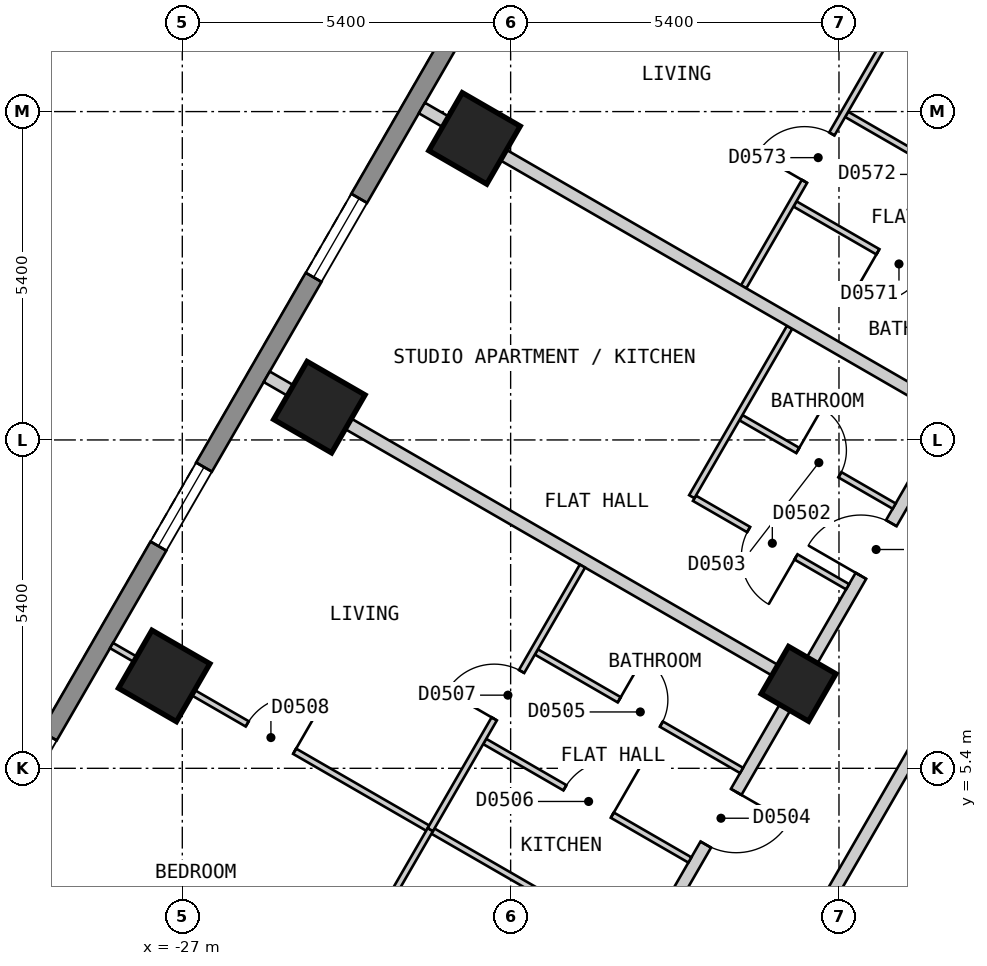
"""IFC4 building model, lengths in metres.
Left out: names, types, materials, properties, quantities, classifications, styles, units other than length and angle.
Written with IfcOpenShell. Run it as: python <this file> out.ifc"""

import sys

from ifc_helpers import new_model, si_unit, direction, frame, frame_2d, origin, origin_2d, place, context, subcontext, project, spatial, polyline, rectangle, outline, extrude, element, fill, save


model = new_model("IFC4")
c1 = context("Model", 3, precision=1e-05, world=origin(), true_north=direction((0.0, 1.0)))
c2 = subcontext(c1, "Body", "Model", "MODEL_VIEW")
j1 = project(units=[si_unit("LENGTHUNIT", "METRE"), si_unit("PLANEANGLEUNIT", "RADIAN")], contexts=[c1])
p1 = place(None, origin())
s1 = spatial("IfcSite", under=j1, at=p1, CompositionType="ELEMENT")
p2 = place(p1, origin())
s2 = spatial("IfcBuilding", under=s1, at=p2, CompositionType="ELEMENT")
p3 = place(p2, frame((0.0, 0.0, 44.4)))
s3 = spatial("IfcBuildingStorey", under=s2, at=p3, CompositionType="ELEMENT", Elevation=44.4)
for number, where, z_axis, x_axis in (
    (1, (-22.194, 15.759, 0.0), (0.0, 0.0, 1.0), (-0.5, -0.866, 0.0)),
    (2, (-24.746, 11.339, 0.0), (0.0, 0.0, 1.0), (-0.5, -0.866, 0.0)),
    (3, (-27.298, 6.919, 0.0), (0.0, 0.0, 1.0), (-0.5, -0.866, 0.0)),
):
    element("IfcColumn", number, at=place(p3, frame(where, z_axis=z_axis, x_axis=x_axis)), inside=s3, PredefinedType="COLUMN", context=c2, shape_type="SweptSolid", body=[
        extrude(rectangle(XDim=1.1, YDim=1.1, at=origin_2d()), origin(), (0.0, 0.0, 1.0), 3.0),
    ])
p4 = place(p3, frame((-16.865, 6.789, 0.0), z_axis=(0.0, 0.0, 1.0), x_axis=(-0.499984884929, -0.866034130299, 0.0)))
e4 = element("IfcColumn", 4, at=p4, inside=s3, PredefinedType="COLUMN", context=c2, shape_type="SweptSolid", body=[
    extrude(rectangle(XDim=0.9, YDim=0.9, at=origin_2d()), origin(), (0.0, 0.0, 1.0), 3.0),
])
p5 = place(p3, frame((-17.71, 25.825, 0.0), z_axis=(0.0, 0.0, 1.0), x_axis=(-0.500001938803, -0.866024284413, 0.0)))
e5 = element("IfcWall", 5, at=p5, inside=s3, PredefinedType="SOLIDWALL", context=c2, shape_type="SweptSolid", body=[
    extrude(outline(polyline([(0.0, -0.15), (27.02, -0.15), (26.94, 0.15), (0.08, 0.15), (0.0, -0.15)])), origin(), (0.0, 0.0, 1.0), 2.7),
])
p6 = place(p5, frame((2.553, 0.0, 0.15)))
e6 = element("IfcOpeningElement", 6, at=p6, cuts=e5, PredefinedType="OPENING", context=c2, shape_type="SweptSolid", body=[
    extrude(rectangle(XDim=1.5, YDim=2.1, at=frame_2d((0.75, 1.05))), frame((0.0, 0.16, 0.0), z_axis=(0.0, -1.0, 0.0), x_axis=(1.0, 0.0, 0.0)), (0.0, 0.0, 1.0), 0.32),
])
p7 = place(p5, frame((7.658, 0.0, 0.15)))
e7 = element("IfcOpeningElement", 7, at=p7, cuts=e5, PredefinedType="OPENING", context=c2, shape_type="SweptSolid", body=[
    extrude(rectangle(XDim=1.5, YDim=2.1, at=frame_2d((0.75, 1.05))), frame((0.0, 0.16, 0.0), z_axis=(0.0, -1.0, 0.0), x_axis=(1.0, 0.0, 0.0)), (0.0, 0.0, 1.0), 0.32),
])
p8 = place(p5, frame((12.761, 0.0, 0.15)))
e8 = element("IfcOpeningElement", 8, at=p8, cuts=e5, PredefinedType="OPENING", context=c2, shape_type="SweptSolid", body=[
    extrude(rectangle(XDim=1.5, YDim=2.1, at=frame_2d((0.75, 1.05))), frame((0.0, 0.16, 0.0), z_axis=(0.0, -1.0, 0.0), x_axis=(1.0, 0.0, 0.0)), (0.0, 0.0, 1.0), 0.32),
])
p9 = place(p5, frame((17.865, 0.0, 0.15)))
e9 = element("IfcOpeningElement", 9, at=p9, cuts=e5, PredefinedType="OPENING", context=c2, shape_type="SweptSolid", body=[
    extrude(rectangle(XDim=1.5, YDim=2.1, at=frame_2d((0.75, 1.05))), frame((0.0, 0.16, 0.0), z_axis=(0.0, -1.0, 0.0), x_axis=(1.0, 0.0, 0.0)), (0.0, 0.0, 1.0), 0.32),
])
p10 = place(p5, frame((22.969, 0.0, 0.15)))
e10 = element("IfcOpeningElement", 10, at=p10, cuts=e5, PredefinedType="OPENING", context=c2, shape_type="SweptSolid", body=[
    extrude(rectangle(XDim=1.5, YDim=2.1, at=frame_2d((0.75, 1.05))), frame((0.0, 0.16, 0.0), z_axis=(0.0, -1.0, 0.0), x_axis=(1.0, 0.0, 0.0)), (0.0, 0.0, 1.0), 0.32),
])
p11 = place(p3, frame((-18.244, -0.001, 0.0), z_axis=(0.0, 0.0, 1.0), x_axis=(0.499962999376, 0.866046765051, 0.0)))
e11 = element("IfcWall", 11, at=p11, inside=s3, PredefinedType="PARTITIONING", context=c2, shape_type="SweptSolid", body=[
    extrude(rectangle(XDim=18.245, YDim=0.2, at=frame_2d((9.123, 0.0))), origin(), (0.0, 0.0, 1.0), 2.7),
])
p12 = place(p11, frame((8.672, 0.0, 0.0)))
e12 = element("IfcOpeningElement", 12, at=p12, cuts=e11, PredefinedType="OPENING", context=c2, shape_type="SweptSolid", body=[
    extrude(rectangle(XDim=0.9, YDim=2.1, at=frame_2d((0.45, 1.05))), frame((0.0, 0.11, 0.0), z_axis=(0.0, -1.0, 0.0), x_axis=(1.0, 0.0, 0.0)), (0.0, 0.0, 1.0), 0.22),
])
p13 = place(p3, frame((-20.727, 0.099, 0.0), z_axis=(0.0, 0.0, 1.0), x_axis=(0.499993204491, 0.866029327138, 0.0)))
e13 = element("IfcWall", 13, at=p13, inside=s3, PredefinedType="PARTITIONING", context=c2, shape_type="SweptSolid", body=[
    extrude(rectangle(XDim=20.554, YDim=0.2, at=frame_2d((10.277, 0.0))), origin(), (0.0, 0.0, 1.0), 2.7),
])
p14 = place(p13, frame((9.776, 0.0, 0.0)))
e14 = element("IfcOpeningElement", 14, at=p14, cuts=e13, PredefinedType="OPENING", context=c2, shape_type="SweptSolid", body=[
    extrude(rectangle(XDim=1.0, YDim=2.1, at=frame_2d((0.5, 1.05))), frame((0.0, 0.11, 0.0), z_axis=(0.0, -1.0, 0.0), x_axis=(1.0, 0.0, 0.0)), (0.0, 0.0, 1.0), 0.22),
])
p15 = place(p13, frame((4.673, 0.0, 0.0)))
e15 = element("IfcOpeningElement", 15, at=p15, cuts=e13, PredefinedType="OPENING", context=c2, shape_type="SweptSolid", body=[
    extrude(rectangle(XDim=1.0, YDim=2.1, at=frame_2d((0.5, 1.05))), frame((0.0, 0.11, 0.0), z_axis=(0.0, -1.0, 0.0), x_axis=(1.0, 0.0, 0.0)), (0.0, 0.0, 1.0), 0.22),
])
p16 = place(p13, frame((14.88, 0.0, 0.0)))
e16 = element("IfcOpeningElement", 16, at=p16, cuts=e13, PredefinedType="OPENING", context=c2, shape_type="SweptSolid", body=[
    extrude(rectangle(XDim=1.0, YDim=2.1, at=frame_2d((0.5, 1.05))), frame((0.0, 0.11, 0.0), z_axis=(0.0, -1.0, 0.0), x_axis=(1.0, 0.0, 0.0)), (0.0, 0.0, 1.0), 0.22),
])
p17 = place(p3, frame((-21.177, 7.314, 0.0), z_axis=(0.0, 0.0, 1.0), x_axis=(0.865979019114, -0.500080332001, 0.0)))
e17 = element("IfcWall", 17, at=p17, inside=s3, PredefinedType="PARTITIONING", context=c2, shape_type="SweptSolid", body=[
    extrude(rectangle(XDim=3.897, YDim=0.1, at=frame_2d((1.949, 0.0))), origin(), (0.0, 0.0, 1.0), 2.7),
])
p18 = place(p17, frame((1.574, 0.0, 0.0)))
e18 = element("IfcOpeningElement", 18, at=p18, cuts=e17, PredefinedType="OPENING", context=c2, shape_type="SweptSolid", body=[
    extrude(rectangle(XDim=0.8, YDim=2.1, at=frame_2d((0.4, 1.05))), frame((0.0, 0.06, 0.0), z_axis=(0.0, -1.0, 0.0), x_axis=(1.0, 0.0, 0.0)), (0.0, 0.0, 1.0), 0.12),
])
p19 = place(p3, frame((-22.027, 5.842, 0.0), z_axis=(0.0, 0.0, 1.0), x_axis=(0.865979019114, -0.500080332001, 0.0)))
e19 = element("IfcWall", 19, at=p19, inside=s3, PredefinedType="PARTITIONING", context=c2, shape_type="SweptSolid", body=[
    extrude(rectangle(XDim=3.897, YDim=0.1, at=frame_2d((1.949, 0.0))), origin(), (0.0, 0.0, 1.0), 2.7),
])
p20 = place(p19, frame((1.524, 0.0, 0.0)))
e20 = element("IfcOpeningElement", 20, at=p20, cuts=e19, PredefinedType="OPENING", context=c2, shape_type="SweptSolid", body=[
    extrude(rectangle(XDim=0.9, YDim=2.1, at=frame_2d((0.45, 1.05))), frame((0.0, 0.06, 0.0), z_axis=(0.0, -1.0, 0.0), x_axis=(1.0, 0.0, 0.0)), (0.0, 0.0, 1.0), 0.12),
])
p21 = place(p3, frame((-28.164, 7.419, 0.0), z_axis=(0.0, 0.0, 1.0), x_axis=(0.866047370643, -0.499961950354, 0.0)))
e21 = element("IfcWall", 21, at=p21, inside=s3, PredefinedType="PARTITIONING", context=c2, shape_type="SweptSolid", body=[
    extrude(rectangle(XDim=10.001, YDim=0.1, at=frame_2d((5.0, 0.0))), origin(), (0.0, 0.0, 1.0), 2.7),
])
p22 = place(p21, frame((2.577, 0.0, 0.0)))
e22 = element("IfcOpeningElement", 22, at=p22, cuts=e21, PredefinedType="OPENING", context=c2, shape_type="SweptSolid", body=[
    extrude(rectangle(XDim=0.9, YDim=2.1, at=frame_2d((0.45, 1.05))), frame((0.0, 0.06, 0.0), z_axis=(0.0, -1.0, 0.0), x_axis=(1.0, 0.0, 0.0)), (0.0, 0.0, 1.0), 0.12),
])
p23 = place(p3, frame((-18.577, 9.841, 0.0), z_axis=(0.0, 0.0, 1.0), x_axis=(0.865899003441, -0.500218867937, 0.0)))
e23 = element("IfcWall", 23, at=p23, inside=s3, PredefinedType="PARTITIONING", context=c2, shape_type="SweptSolid", body=[
    extrude(rectangle(XDim=2.909, YDim=0.1, at=frame_2d((1.455, 0.0))), origin(), (0.0, 0.0, 1.0), 2.7),
])
p24 = place(p23, frame((1.029, 0.0, 0.0)))
e24 = element("IfcOpeningElement", 24, at=p24, cuts=e23, PredefinedType="OPENING", context=c2, shape_type="SweptSolid", body=[
    extrude(rectangle(XDim=0.9, YDim=2.1, at=frame_2d((0.45, 1.05))), frame((0.0, 0.06, 0.0), z_axis=(0.0, -1.0, 0.0), x_axis=(1.0, 0.0, 0.0)), (0.0, 0.0, 1.0), 0.12),
])
p25 = place(p3, frame((-16.923, 14.681, 0.0), z_axis=(0.0, 0.0, 1.0), x_axis=(0.866087525071, -0.499892387336, 0.0)))
e25 = element("IfcWall", 25, at=p25, inside=s3, PredefinedType="PARTITIONING", context=c2, shape_type="SweptSolid", body=[
    extrude(rectangle(XDim=3.897, YDim=0.1, at=frame_2d((1.948, 0.0))), origin(), (0.0, 0.0, 1.0), 2.7),
])
p26 = place(p25, frame((1.574, 0.0, 0.0)))
e26 = element("IfcOpeningElement", 26, at=p26, cuts=e25, PredefinedType="OPENING", context=c2, shape_type="SweptSolid", body=[
    extrude(rectangle(XDim=0.8, YDim=2.1, at=frame_2d((0.4, 1.05))), frame((0.0, 0.06, 0.0), z_axis=(0.0, -1.0, 0.0), x_axis=(1.0, 0.0, 0.0)), (0.0, 0.0, 1.0), 0.12),
])
p27 = place(p3, frame((-16.073, 16.154, 0.0), z_axis=(0.0, 0.0, 1.0), x_axis=(0.865979019114, -0.500080332001, 0.0)))
e27 = element("IfcWall", 27, at=p27, inside=s3, PredefinedType="PARTITIONING", context=c2, shape_type="SweptSolid", body=[
    extrude(rectangle(XDim=3.897, YDim=0.1, at=frame_2d((1.949, 0.0))), origin(), (0.0, 0.0, 1.0), 2.7),
])
p28 = place(p27, frame((1.524, 0.0, 0.0)))
e28 = element("IfcOpeningElement", 28, at=p28, cuts=e27, PredefinedType="OPENING", context=c2, shape_type="SweptSolid", body=[
    extrude(rectangle(XDim=0.9, YDim=2.1, at=frame_2d((0.45, 1.05))), frame((0.0, 0.06, 0.0), z_axis=(0.0, -1.0, 0.0), x_axis=(1.0, 0.0, 0.0)), (0.0, 0.0, 1.0), 0.12),
])
p29 = place(p3, frame((-17.813, 11.167, 0.0), z_axis=(0.0, 0.0, 1.0), x_axis=(0.866087824531, -0.499891868507, 0.0)))
e29 = element("IfcWall", 29, at=p29, inside=s3, PredefinedType="PARTITIONING", context=c2, shape_type="SweptSolid", body=[
    extrude(rectangle(XDim=2.911, YDim=0.1, at=frame_2d((1.456, 0.0))), origin(), (0.0, 0.0, 1.0), 2.7),
])
p30 = place(p29, frame((1.08, 0.0, 0.0)))
e30 = element("IfcOpeningElement", 30, at=p30, cuts=e29, PredefinedType="OPENING", context=c2, shape_type="SweptSolid", body=[
    extrude(rectangle(XDim=0.8, YDim=2.1, at=frame_2d((0.4, 1.05))), frame((0.0, 0.06, 0.0), z_axis=(0.0, -1.0, 0.0), x_axis=(1.0, 0.0, 0.0)), (0.0, 0.0, 1.0), 0.12),
])
p31 = place(p3, frame((-20.508, 20.679, 0.0), z_axis=(0.0, 0.0, 1.0), x_axis=(0.866047370643, -0.499961950354, 0.0)))
e31 = element("IfcWall", 31, at=p31, inside=s3, PredefinedType="PARTITIONING", context=c2, shape_type="SweptSolid", body=[
    extrude(rectangle(XDim=10.001, YDim=0.1, at=frame_2d((5.0, 0.0))), origin(), (0.0, 0.0, 1.0), 2.7),
])
p32 = place(p31, frame((2.576, 0.0, 0.0)))
e32 = element("IfcOpeningElement", 32, at=p32, cuts=e31, PredefinedType="OPENING", context=c2, shape_type="SweptSolid", body=[
    extrude(rectangle(XDim=0.9, YDim=2.1, at=frame_2d((0.45, 1.05))), frame((0.0, 0.06, 0.0), z_axis=(0.0, -1.0, 0.0), x_axis=(1.0, 0.0, 0.0)), (0.0, 0.0, 1.0), 0.12),
])
p33 = place(p3, frame((-18.621, 9.867, 0.0), z_axis=(0.0, 0.0, 1.0), x_axis=(0.500197891286, 0.865911121047, 0.0)))
e33 = element("IfcWall", 33, at=p33, inside=s3, PredefinedType="PARTITIONING", context=c2, shape_type="SweptSolid", body=[
    extrude(rectangle(XDim=3.215, YDim=0.1, at=frame_2d((1.607, 0.0))), origin(), (0.0, 0.0, 1.0), 2.7),
])
p34 = place(p3, frame((-25.358, 0.173, 0.0), z_axis=(0.0, 0.0, 1.0), x_axis=(0.500180754623, 0.8659210199, 0.0)))
e34 = element("IfcWall", 34, at=p34, inside=s3, PredefinedType="PARTITIONING", context=c2, shape_type="SweptSolid", body=[
    extrude(rectangle(XDim=4.872, YDim=0.1, at=frame_2d((2.436, 0.0))), origin(), (0.0, 0.0, 1.0), 2.7),
])
p35 = place(p34, frame((1.936, 0.0, 0.0)))
e35 = element("IfcOpeningElement", 35, at=p35, cuts=e34, PredefinedType="OPENING", context=c2, shape_type="SweptSolid", body=[
    extrude(rectangle(XDim=0.8, YDim=2.1, at=frame_2d((0.4, 1.05))), frame((0.0, 0.06, 0.0), z_axis=(0.0, -1.0, 0.0), x_axis=(1.0, 0.0, 0.0)), (0.0, 0.0, 1.0), 0.12),
])
p36 = place(p3, frame((-17.768, 13.319, 0.0), z_axis=(0.0, 0.0, 1.0), x_axis=(0.499958946799, 0.866049104564, 0.0)))
e36 = element("IfcWall", 36, at=p36, inside=s3, PredefinedType="PARTITIONING", context=c2, shape_type="SweptSolid", body=[
    extrude(rectangle(XDim=5.004, YDim=0.1, at=frame_2d((2.502, 0.0))), origin(), (0.0, 0.0, 1.0), 2.7),
])
p37 = place(p36, frame((2.002, 0.0, 0.0)))
e37 = element("IfcOpeningElement", 37, at=p37, cuts=e36, PredefinedType="OPENING", context=c2, shape_type="SweptSolid", body=[
    extrude(rectangle(XDim=0.9, YDim=2.1, at=frame_2d((0.45, 1.05))), frame((0.0, 0.06, 0.0), z_axis=(0.0, -1.0, 0.0), x_axis=(1.0, 0.0, 0.0)), (0.0, 0.0, 1.0), 0.12),
])
p38 = place(p3, frame((-25.611, 11.839, 0.0), z_axis=(0.0, 0.0, 1.0), x_axis=(0.866022959057, -0.500004234368, 0.0)))
e38 = element("IfcWall", 38, at=p38, inside=s3, PredefinedType="PARTITIONING", context=c2, shape_type="SweptSolid", body=[
    extrude(rectangle(XDim=10.0, YDim=0.2, at=frame_2d((5.0, 0.0))), origin(), (0.0, 0.0, 1.0), 2.7),
])
p39 = place(p3, frame((-23.06, 16.259, 0.0), z_axis=(0.0, 0.0, 1.0), x_axis=(0.866047370643, -0.499961950354, 0.0)))
e39 = element("IfcWall", 39, at=p39, inside=s3, PredefinedType="PARTITIONING", context=c2, shape_type="SweptSolid", body=[
    extrude(rectangle(XDim=10.001, YDim=0.2, at=frame_2d((5.0, 0.0))), origin(), (0.0, 0.0, 1.0), 2.7),
])
p40 = place(p3, frame((-22.921, 4.392, 0.0), z_axis=(0.0, 0.0, 1.0), x_axis=(0.499958946799, 0.866049104564, 0.0)))
e40 = element("IfcWall", 40, at=p40, inside=s3, PredefinedType="PARTITIONING", context=c2, shape_type="SweptSolid", body=[
    extrude(rectangle(XDim=5.004, YDim=0.1, at=frame_2d((2.502, 0.0))), origin(), (0.0, 0.0, 1.0), 2.7),
])
p41 = place(p40, frame((2.103, 0.0, 0.0)))
e41 = element("IfcOpeningElement", 41, at=p41, cuts=e40, PredefinedType="OPENING", context=c2, shape_type="SweptSolid", body=[
    extrude(rectangle(XDim=0.9, YDim=2.1, at=frame_2d((0.45, 1.05))), frame((0.0, 0.06, 0.0), z_axis=(0.0, -1.0, 0.0), x_axis=(1.0, 0.0, 0.0)), (0.0, 0.0, 1.0), 0.12),
])
p42 = place(p8, origin())
e42 = element("IfcWindow", 42, at=p42, inside=s3, PartitioningType="SINGLE_PANEL", PredefinedType="WINDOW", context=c2, shape_type="SweptSolid", body=[
    extrude(rectangle(XDim=1.5, YDim=2.1, at=frame_2d((0.75, 1.05))), frame((0.0, 0.03, 0.0), z_axis=(0.0, -1.0, 0.0), x_axis=(1.0, 0.0, 0.0)), (0.0, 0.0, 1.0), 0.06),
])
fill(e8, e42)
p43 = place(p9, origin())
e43 = element("IfcWindow", 43, at=p43, inside=s3, PartitioningType="SINGLE_PANEL", PredefinedType="WINDOW", context=c2, shape_type="SweptSolid", body=[
    extrude(rectangle(XDim=1.5, YDim=2.1, at=frame_2d((0.75, 1.05))), frame((0.0, 0.03, 0.0), z_axis=(0.0, -1.0, 0.0), x_axis=(1.0, 0.0, 0.0)), (0.0, 0.0, 1.0), 0.06),
])
fill(e9, e43)
p44 = place(p14, origin())
e44 = element("IfcDoor", 44, at=p44, inside=s3, OperationType="SINGLE_SWING_LEFT", PredefinedType="DOOR", context=c2, shape_type="SweptSolid", body=[
    extrude(rectangle(XDim=1.0, YDim=2.1, at=frame_2d((0.5, 1.05))), frame((0.0, 0.025, 0.0), z_axis=(0.0, -1.0, 0.0), x_axis=(1.0, 0.0, 0.0)), (0.0, 0.0, 1.0), 0.05),
])
fill(e14, e44)
p45 = place(p24, origin())
e45 = element("IfcDoor", 45, at=p45, inside=s3, OperationType="SINGLE_SWING_RIGHT", PredefinedType="DOOR", context=c2, shape_type="SweptSolid", body=[
    extrude(rectangle(XDim=0.9, YDim=2.1, at=frame_2d((0.45, 1.05))), frame((0.0, 0.025, 0.0), z_axis=(0.0, -1.0, 0.0), x_axis=(1.0, 0.0, 0.0)), (0.0, 0.0, 1.0), 0.05),
])
fill(e24, e45)
p46 = place(p30, origin())
e46 = element("IfcDoor", 46, at=p46, inside=s3, OperationType="SINGLE_SWING_LEFT", PredefinedType="DOOR", context=c2, shape_type="SweptSolid", body=[
    extrude(rectangle(XDim=0.8, YDim=2.1, at=frame_2d((0.4, 1.05))), frame((0.0, 0.025, 0.0), z_axis=(0.0, -1.0, 0.0), x_axis=(1.0, 0.0, 0.0)), (0.0, 0.0, 1.0), 0.05),
])
fill(e30, e46)
p47 = place(p15, origin())
e47 = element("IfcDoor", 47, at=p47, inside=s3, OperationType="SINGLE_SWING_RIGHT", PredefinedType="DOOR", context=c2, shape_type="SweptSolid", body=[
    extrude(rectangle(XDim=1.0, YDim=2.1, at=frame_2d((0.5, 1.05))), frame((0.0, 0.025, 0.0), z_axis=(0.0, -1.0, 0.0), x_axis=(1.0, 0.0, 0.0)), (0.0, 0.0, 1.0), 0.05),
])
fill(e15, e47)
p48 = place(p18, origin())
e48 = element("IfcDoor", 48, at=p48, inside=s3, OperationType="SINGLE_SWING_LEFT", PredefinedType="DOOR", context=c2, shape_type="SweptSolid", body=[
    extrude(rectangle(XDim=0.8, YDim=2.1, at=frame_2d((0.4, 1.05))), frame((0.0, 0.025, 0.0), z_axis=(0.0, -1.0, 0.0), x_axis=(1.0, 0.0, 0.0)), (0.0, 0.0, 1.0), 0.05),
])
fill(e18, e48)
p49 = place(p20, origin())
e49 = element("IfcDoor", 49, at=p49, inside=s3, OperationType="SINGLE_SWING_RIGHT", PredefinedType="DOOR", context=c2, shape_type="SweptSolid", body=[
    extrude(rectangle(XDim=0.9, YDim=2.1, at=frame_2d((0.45, 1.05))), frame((0.0, 0.025, 0.0), z_axis=(0.0, -1.0, 0.0), x_axis=(1.0, 0.0, 0.0)), (0.0, 0.0, 1.0), 0.05),
])
fill(e20, e49)
p50 = place(p41, origin())
e50 = element("IfcDoor", 50, at=p50, inside=s3, OperationType="SINGLE_SWING_LEFT", PredefinedType="DOOR", context=c2, shape_type="SweptSolid", body=[
    extrude(rectangle(XDim=0.9, YDim=2.1, at=frame_2d((0.45, 1.05))), frame((0.0, 0.025, 0.0), z_axis=(0.0, -1.0, 0.0), x_axis=(1.0, 0.0, 0.0)), (0.0, 0.0, 1.0), 0.05),
])
fill(e41, e50)
p51 = place(p22, origin())
e51 = element("IfcDoor", 51, at=p51, inside=s3, OperationType="SINGLE_SWING_RIGHT", PredefinedType="DOOR", context=c2, shape_type="SweptSolid", body=[
    extrude(rectangle(XDim=0.9, YDim=2.1, at=frame_2d((0.45, 1.05))), frame((0.0, 0.025, 0.0), z_axis=(0.0, -1.0, 0.0), x_axis=(1.0, 0.0, 0.0)), (0.0, 0.0, 1.0), 0.05),
])
fill(e22, e51)
p52 = place(p26, origin())
e52 = element("IfcDoor", 52, at=p52, inside=s3, OperationType="SINGLE_SWING_LEFT", PredefinedType="DOOR", context=c2, shape_type="SweptSolid", body=[
    extrude(rectangle(XDim=0.8, YDim=2.1, at=frame_2d((0.4, 1.05))), frame((0.0, 0.025, 0.0), z_axis=(0.0, -1.0, 0.0), x_axis=(1.0, 0.0, 0.0)), (0.0, 0.0, 1.0), 0.05),
])
fill(e26, e52)
p53 = place(p37, origin())
e53 = element("IfcDoor", 53, at=p53, inside=s3, OperationType="SINGLE_SWING_LEFT", PredefinedType="DOOR", context=c2, shape_type="SweptSolid", body=[
    extrude(rectangle(XDim=0.9, YDim=2.1, at=frame_2d((0.45, 1.05))), frame((0.0, 0.025, 0.0), z_axis=(0.0, -1.0, 0.0), x_axis=(1.0, 0.0, 0.0)), (0.0, 0.0, 1.0), 0.05),
])
fill(e37, e53)
save(model, sys.argv[1])
